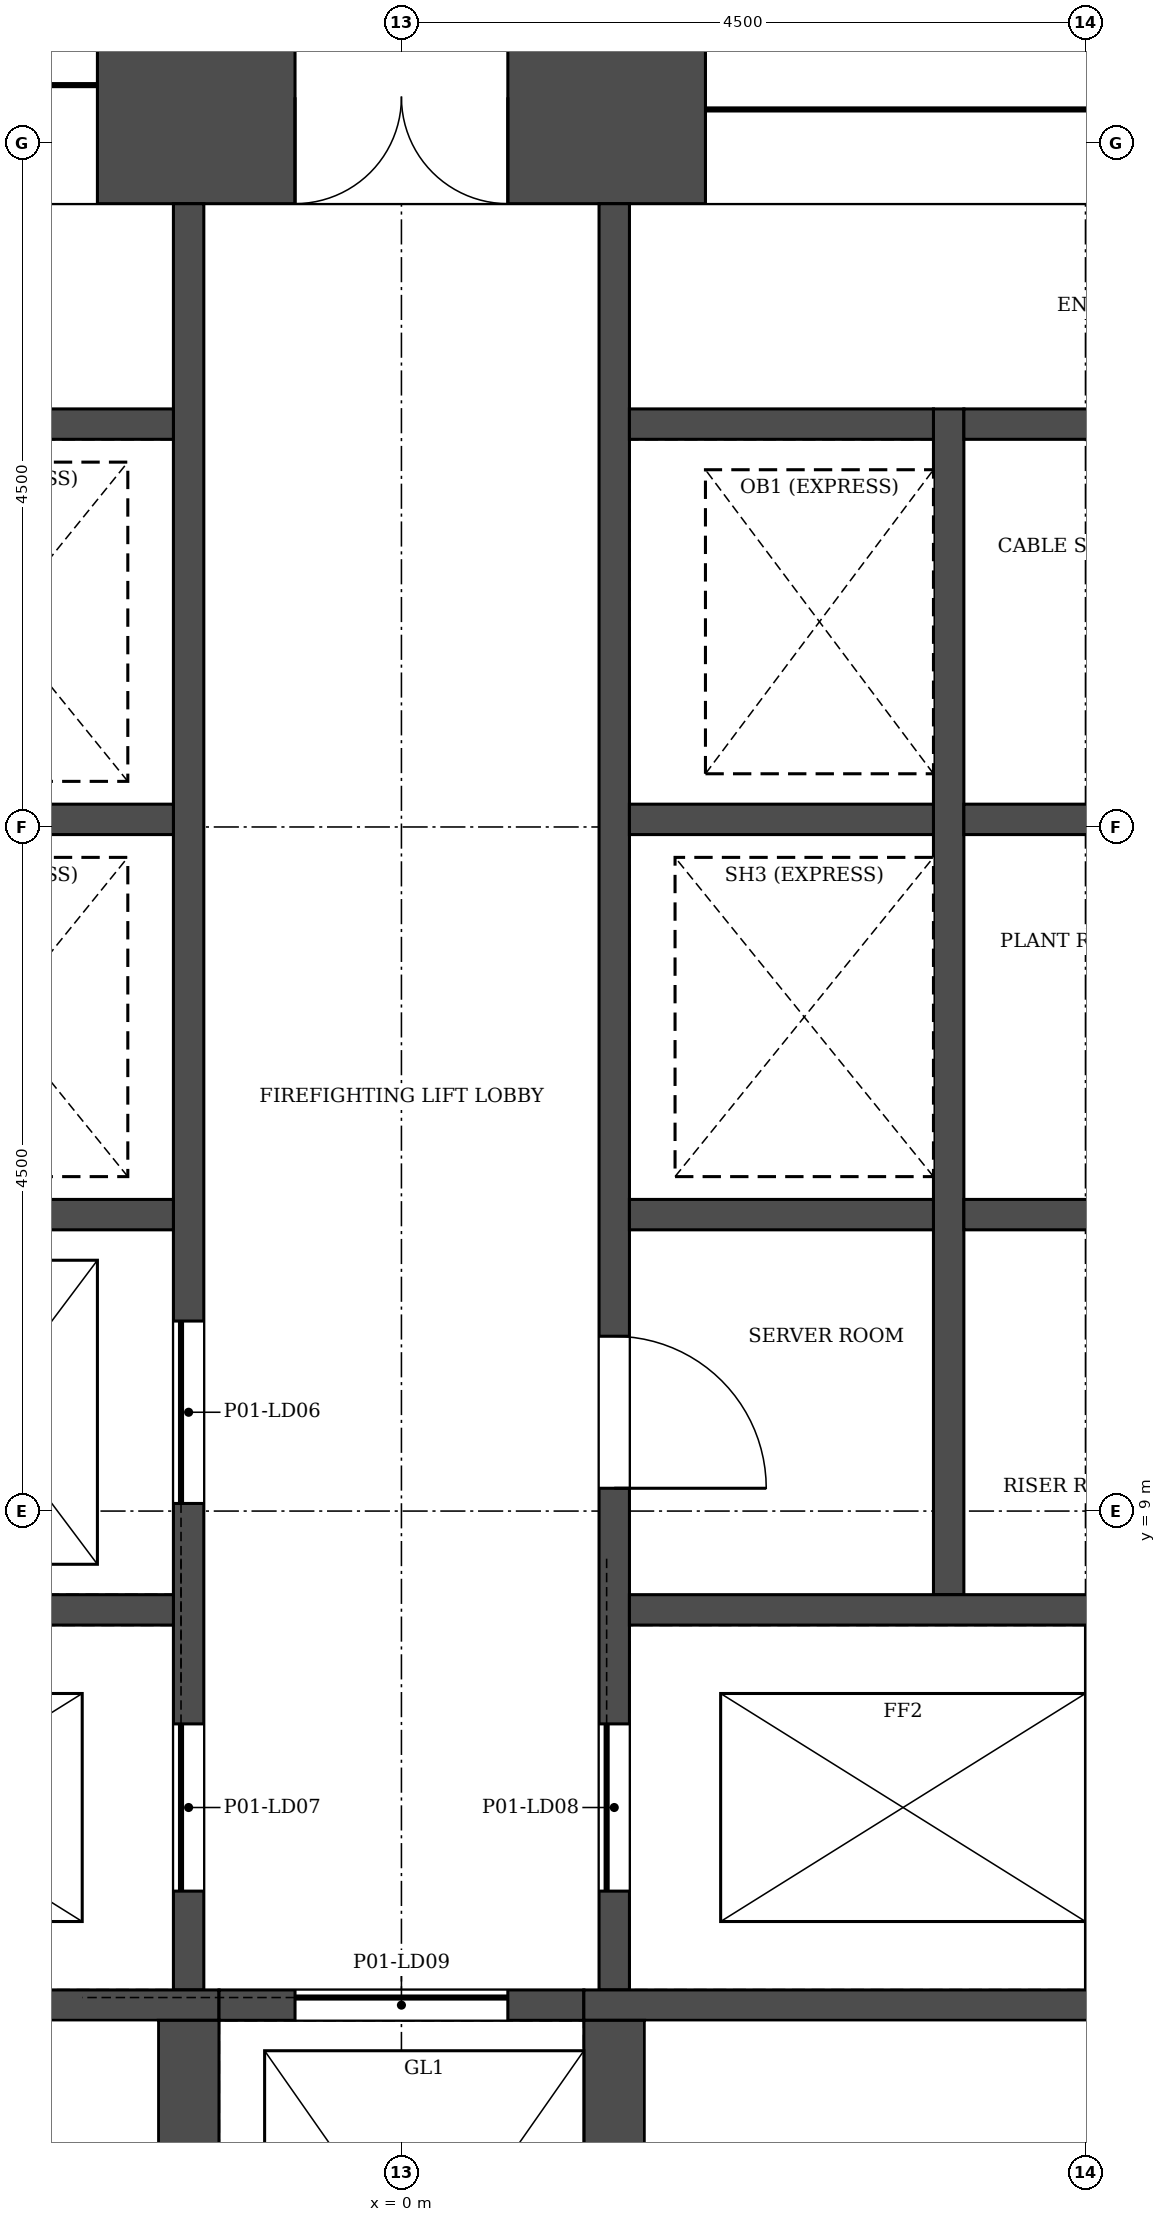
"""IFC4 building model, lengths in metres.
Left out: names, types, materials, properties, quantities, classifications, styles, units other than length and angle.
Written with IfcOpenShell. Run it as: python <this file> out.ifc"""

import sys

from ifc_helpers import new_model, si_unit, direction, frame, frame_2d, origin, place, context, subcontext, project, spatial, rectangle, extrude, element, fill, save


model = new_model("IFC4")
c1 = context("Model", 3, precision=1e-05, world=origin(), true_north=direction((0.0, 1.0)))
c2 = subcontext(c1, "Body", "Model", "MODEL_VIEW")
j1 = project(units=[si_unit("LENGTHUNIT", "METRE"), si_unit("PLANEANGLEUNIT", "RADIAN")], contexts=[c1])
p1 = place(None, origin())
s1 = spatial("IfcSite", under=j1, at=p1, CompositionType="ELEMENT")
p2 = place(p1, origin())
s2 = spatial("IfcBuilding", under=s1, at=p2, CompositionType="ELEMENT")
p3 = place(p2, frame((0.0, 0.0, 8.0)))
s3 = spatial("IfcBuildingStorey", under=s2, at=p3, CompositionType="ELEMENT", Elevation=8.0)
p4 = place(p3, frame((9.412, 18.3, 0.0), z_axis=(0.0, 0.0, 1.0), x_axis=(-1.0, 0.0, 0.0)))
e1 = element("IfcWall", 1, at=p4, inside=s3, PredefinedType="SHEAR", context=c2, shape_type="SweptSolid", body=[
    extrude(rectangle(XDim=18.823, YDim=1.4, at=frame_2d((9.412, 0.0))), origin(), (0.0, 0.0, 1.0), 6.0),
])
p5 = place(p4, frame((8.711, 0.0, 0.0)))
e2 = element("IfcOpeningElement", 2, at=p5, cuts=e1, PredefinedType="OPENING", context=c2, shape_type="SweptSolid", body=[
    extrude(rectangle(XDim=1.4, YDim=2.1, at=frame_2d((0.7, 1.05))), frame((0.0, 0.71, 0.0), z_axis=(0.0, -1.0, 0.0), x_axis=(1.0, 0.0, 0.0)), (0.0, 0.0, 1.0), 1.42),
])
p6 = place(p4, frame((11.412, 0.0, 0.0)))
e3 = element("IfcOpeningElement", 3, at=p6, cuts=e1, PredefinedType="OPENING", context=c2, shape_type="SweptSolid", body=[
    extrude(rectangle(XDim=6.0, YDim=2.4, at=frame_2d((3.0, 1.2))), frame((0.0, 0.71, 0.0), z_axis=(0.0, -1.0, 0.0), x_axis=(1.0, 0.0, 0.0)), (0.0, 0.0, 1.0), 1.42),
])
p7 = place(p4, frame((1.412, 0.0, 0.0)))
e4 = element("IfcOpeningElement", 4, at=p7, cuts=e1, PredefinedType="OPENING", context=c2, shape_type="SweptSolid", body=[
    extrude(rectangle(XDim=6.0, YDim=2.4, at=frame_2d((3.0, 1.2))), frame((0.0, 0.71, 0.0), z_axis=(0.0, -1.0, 0.0), x_axis=(1.0, 0.0, 0.0)), (0.0, 0.0, 1.0), 1.42),
])
p8 = place(p3, frame((3.6, 8.45, -0.3), z_axis=(0.0, 0.0, 1.0), x_axis=(0.0, 1.0, 0.0)))
e5 = element("IfcWall", 5, at=p8, inside=s3, PredefinedType="SOLIDWALL", context=c2, shape_type="SweptSolid", body=[
    extrude(rectangle(XDim=7.8, YDim=0.2, at=frame_2d((3.9, 0.0))), origin(), (0.0, 0.0, 1.0), 6.0),
])
p9 = place(p3, frame((-1.4, 5.85, -0.3), z_axis=(0.0, 0.0, 1.0), x_axis=(0.0, 1.0, 0.0)))
e6 = element("IfcWall", 6, at=p9, inside=s3, PredefinedType="SOLIDWALL", context=c2, shape_type="SweptSolid", body=[
    extrude(rectangle(XDim=11.75, YDim=0.2, at=frame_2d((5.875, 0.0))), origin(), (0.0, 0.0, 1.0), 6.0),
])
p10 = place(p9, frame((3.2, 0.0, 0.3)))
e7 = element("IfcOpeningElement", 7, at=p10, cuts=e6, PredefinedType="OPENING", context=c2, shape_type="SweptSolid", body=[
    extrude(rectangle(XDim=1.2, YDim=2.1, at=frame_2d((0.6, 1.05))), frame((0.0, 0.11, 0.0), z_axis=(0.0, -1.0, 0.0), x_axis=(1.0, 0.0, 0.0)), (0.0, 0.0, 1.0), 0.22),
])
p11 = place(p9, frame((0.65, 0.0, 0.3)))
e8 = element("IfcOpeningElement", 8, at=p11, cuts=e6, PredefinedType="OPENING", context=c2, shape_type="SweptSolid", body=[
    extrude(rectangle(XDim=1.1, YDim=2.1, at=frame_2d((0.55, 1.05))), frame((0.0, 0.11, 0.0), z_axis=(0.0, -1.0, 0.0), x_axis=(1.0, 0.0, 0.0)), (0.0, 0.0, 1.0), 0.22),
])
p12 = place(p3, frame((1.4, 5.85, -0.3), z_axis=(0.0, 0.0, 1.0), x_axis=(0.0, 1.0, 0.0)))
e9 = element("IfcWall", 9, at=p12, inside=s3, PredefinedType="SOLIDWALL", context=c2, shape_type="SweptSolid", body=[
    extrude(rectangle(XDim=11.75, YDim=0.2, at=frame_2d((5.875, 0.0))), origin(), (0.0, 0.0, 1.0), 6.0),
])
p13 = place(p12, frame((0.65, 0.0, 0.3)))
e10 = element("IfcOpeningElement", 10, at=p13, cuts=e9, PredefinedType="OPENING", context=c2, shape_type="SweptSolid", body=[
    extrude(rectangle(XDim=1.1, YDim=2.1, at=frame_2d((0.55, 1.05))), frame((0.0, 0.11, 0.0), z_axis=(0.0, -1.0, 0.0), x_axis=(1.0, 0.0, 0.0)), (0.0, 0.0, 1.0), 0.22),
])
p14 = place(p12, frame((3.3, 0.0, 0.3)))
e11 = element("IfcOpeningElement", 11, at=p14, cuts=e9, PredefinedType="OPENING", context=c2, shape_type="SweptSolid", body=[
    extrude(rectangle(XDim=1.0, YDim=2.1, at=frame_2d((0.5, 1.05))), frame((0.0, 0.11, 0.0), z_axis=(0.0, -1.0, 0.0), x_axis=(1.0, 0.0, 0.0)), (0.0, 0.0, 1.0), 0.22),
])
for number, where, z_axis, x_axis in (
    (12, (-5.7, 8.35, -0.3), (0.0, 0.0, 1.0), (1.0, 0.0, 0.0)),
    (13, (1.5, 8.35, -0.3), (0.0, 0.0, 1.0), (1.0, 0.0, 0.0)),
):
    element("IfcWall", number, at=place(p3, frame(where, z_axis=z_axis, x_axis=x_axis)), inside=s3, PredefinedType="SOLIDWALL", context=c2, shape_type="SweptSolid", body=[
        extrude(rectangle(XDim=4.2, YDim=0.2, at=frame_2d((2.1, 0.0))), origin(), (0.0, 0.0, 1.0), 6.0),
    ])
p15 = place(p3, frame((-12.6, 5.75, -0.3), z_axis=(0.0, 0.0, 1.0), x_axis=(1.0, 0.0, 0.0)))
e14 = element("IfcWall", 14, at=p15, inside=s3, PredefinedType="SOLIDWALL", context=c2, shape_type="SweptSolid", body=[
    extrude(rectangle(XDim=11.4, YDim=0.2, at=frame_2d((5.7, 0.0))), origin(), (0.0, 0.0, 1.0), 6.0),
])
p16 = place(p3, frame((-1.2, 5.75, -0.3), z_axis=(0.0, 0.0, 1.0), x_axis=(1.0, 0.0, 0.0)))
e15 = element("IfcWall", 15, at=p16, inside=s3, PredefinedType="SOLIDWALL", context=c2, shape_type="SweptSolid", body=[
    extrude(rectangle(XDim=2.4, YDim=0.2, at=frame_2d((1.2, 0.0))), origin(), (0.0, 0.0, 1.0), 6.0),
])
p17 = place(p16, frame((0.5, 0.0, 0.3)))
e16 = element("IfcOpeningElement", 16, at=p17, cuts=e15, PredefinedType="OPENING", context=c2, shape_type="SweptSolid", body=[
    extrude(rectangle(XDim=1.4, YDim=2.1, at=frame_2d((0.7, 1.05))), frame((0.0, 0.11, 0.0), z_axis=(0.0, -1.0, 0.0), x_axis=(1.0, 0.0, 0.0)), (0.0, 0.0, 1.0), 0.22),
])
p18 = place(p3, frame((1.2, 5.75, -0.3), z_axis=(0.0, 0.0, 1.0), x_axis=(1.0, 0.0, 0.0)))
e17 = element("IfcWall", 17, at=p18, inside=s3, PredefinedType="SOLIDWALL", context=c2, shape_type="SweptSolid", body=[
    extrude(rectangle(XDim=11.4, YDim=0.2, at=frame_2d((5.7, 0.0))), origin(), (0.0, 0.0, 1.0), 6.0),
])
for number, where, z_axis, x_axis in (
    (18, (-1.4, 2.25, -0.3), (0.0, 0.0, 1.0), (0.0, 1.0, 0.0)),
    (19, (1.4, 2.25, -0.3), (0.0, 0.0, 1.0), (0.0, 1.0, 0.0)),
):
    element("IfcWall", number, at=place(p3, frame(where, z_axis=z_axis, x_axis=x_axis)), inside=s3, PredefinedType="SOLIDWALL", context=c2, shape_type="SweptSolid", body=[
        extrude(rectangle(XDim=3.4, YDim=0.4, at=frame_2d((1.7, 0.0))), origin(), (0.0, 0.0, 1.0), 6.0),
    ])
for number, where, z_axis, x_axis in (
    (20, (-3.5, 10.95, -0.3), (0.0, 0.0, 1.0), (1.0, 0.0, 0.0)),
    (21, (-3.5, 13.55, -0.3), (0.0, 0.0, 1.0), (1.0, 0.0, 0.0)),
    (22, (-3.5, 16.15, -0.3), (0.0, 0.0, 1.0), (1.0, 0.0, 0.0)),
    (23, (3.7, 10.95, -0.3), (0.0, 0.0, 1.0), (1.0, 0.0, 0.0)),
    (24, (3.7, 13.55, -0.3), (0.0, 0.0, 1.0), (1.0, 0.0, 0.0)),
    (25, (3.7, 16.15, -0.3), (0.0, 0.0, 1.0), (1.0, 0.0, 0.0)),
    (26, (1.5, 10.95, -0.3), (0.0, 0.0, 1.0), (1.0, 0.0, 0.0)),
    (27, (1.5, 13.55, -0.3), (0.0, 0.0, 1.0), (1.0, 0.0, 0.0)),
    (28, (1.5, 16.15, -0.3), (0.0, 0.0, 1.0), (1.0, 0.0, 0.0)),
):
    element("IfcWall", number, at=place(p3, frame(where, z_axis=z_axis, x_axis=x_axis)), inside=s3, PredefinedType="SOLIDWALL", context=c2, shape_type="SweptSolid", body=[
        extrude(rectangle(XDim=2.0, YDim=0.2, at=frame_2d((1.0, 0.0))), origin(), (0.0, 0.0, 1.0), 6.0),
    ])
p19 = place(p10, origin())
e29 = element("IfcDoor", 29, at=p19, inside=s3, OperationType="SLIDING_TO_LEFT", PredefinedType="DOOR", context=c2, shape_type="SweptSolid", body=[
    extrude(rectangle(XDim=1.2, YDim=2.1, at=frame_2d((0.6, 1.05))), frame((0.0, 0.025, 0.0), z_axis=(0.0, -1.0, 0.0), x_axis=(1.0, 0.0, 0.0)), (0.0, 0.0, 1.0), 0.05),
])
fill(e7, e29)
p20 = place(p11, origin())
e30 = element("IfcDoor", 30, at=p20, inside=s3, OperationType="SLIDING_TO_RIGHT", PredefinedType="DOOR", context=c2, shape_type="SweptSolid", body=[
    extrude(rectangle(XDim=1.1, YDim=2.1, at=frame_2d((0.55, 1.05))), frame((0.0, 0.025, 0.0), z_axis=(0.0, -1.0, 0.0), x_axis=(1.0, 0.0, 0.0)), (0.0, 0.0, 1.0), 0.05),
])
fill(e8, e30)
p21 = place(p13, origin())
e31 = element("IfcDoor", 31, at=p21, inside=s3, OperationType="SLIDING_TO_RIGHT", PredefinedType="DOOR", context=c2, shape_type="SweptSolid", body=[
    extrude(rectangle(XDim=1.1, YDim=2.1, at=frame_2d((0.55, 1.05))), frame((0.0, 0.025, 0.0), z_axis=(0.0, -1.0, 0.0), x_axis=(1.0, 0.0, 0.0)), (0.0, 0.0, 1.0), 0.05),
])
fill(e10, e31)
p22 = place(p17, origin())
e32 = element("IfcDoor", 32, at=p22, inside=s3, OperationType="SLIDING_TO_LEFT", PredefinedType="DOOR", context=c2, shape_type="SweptSolid", body=[
    extrude(rectangle(XDim=1.4, YDim=2.1, at=frame_2d((0.7, 1.05))), frame((0.0, 0.025, 0.0), z_axis=(0.0, -1.0, 0.0), x_axis=(1.0, 0.0, 0.0)), (0.0, 0.0, 1.0), 0.05),
])
fill(e16, e32)
p23 = place(p14, frame((1.0, 0.0, 0.0), z_axis=(0.0, 0.0, 1.0), x_axis=(-1.0, 0.0, 0.0)))
e33 = element("IfcDoor", 33, at=p23, inside=s3, OperationType="SINGLE_SWING_RIGHT", PredefinedType="DOOR", context=c2, shape_type="SweptSolid", body=[
    extrude(rectangle(XDim=1.0, YDim=2.1, at=frame_2d((0.5, 1.05))), frame((0.0, 0.025, 0.0), z_axis=(0.0, -1.0, 0.0), x_axis=(1.0, 0.0, 0.0)), (0.0, 0.0, 1.0), 0.05),
])
fill(e11, e33)
p24 = place(p5, origin())
e34 = element("IfcDoor", 34, at=p24, inside=s3, OperationType="DOUBLE_DOOR_SINGLE_SWING", PredefinedType="DOOR", context=c2, shape_type="SweptSolid", body=[
    extrude(rectangle(XDim=1.4, YDim=2.1, at=frame_2d((0.7, 1.05))), frame((0.0, 0.025, 0.0), z_axis=(0.0, -1.0, 0.0), x_axis=(1.0, 0.0, 0.0)), (0.0, 0.0, 1.0), 0.05),
])
fill(e2, e34)
p25 = place(p6, origin())
e35 = element("IfcDoor", 35, at=p25, inside=s3, OperationType="DOUBLE_DOOR_SLIDING", PredefinedType="DOOR", context=c2, shape_type="SweptSolid", body=[
    extrude(rectangle(XDim=6.0, YDim=2.4, at=frame_2d((3.0, 1.2))), frame((0.0, 0.025, 0.0), z_axis=(0.0, -1.0, 0.0), x_axis=(1.0, 0.0, 0.0)), (0.0, 0.0, 1.0), 0.05),
])
fill(e3, e35)
p26 = place(p7, origin())
e36 = element("IfcDoor", 36, at=p26, inside=s3, OperationType="DOUBLE_DOOR_SLIDING", PredefinedType="DOOR", context=c2, shape_type="SweptSolid", body=[
    extrude(rectangle(XDim=6.0, YDim=2.4, at=frame_2d((3.0, 1.2))), frame((0.0, 0.025, 0.0), z_axis=(0.0, -1.0, 0.0), x_axis=(1.0, 0.0, 0.0)), (0.0, 0.0, 1.0), 0.05),
])
fill(e4, e36)
save(model, sys.argv[1])
